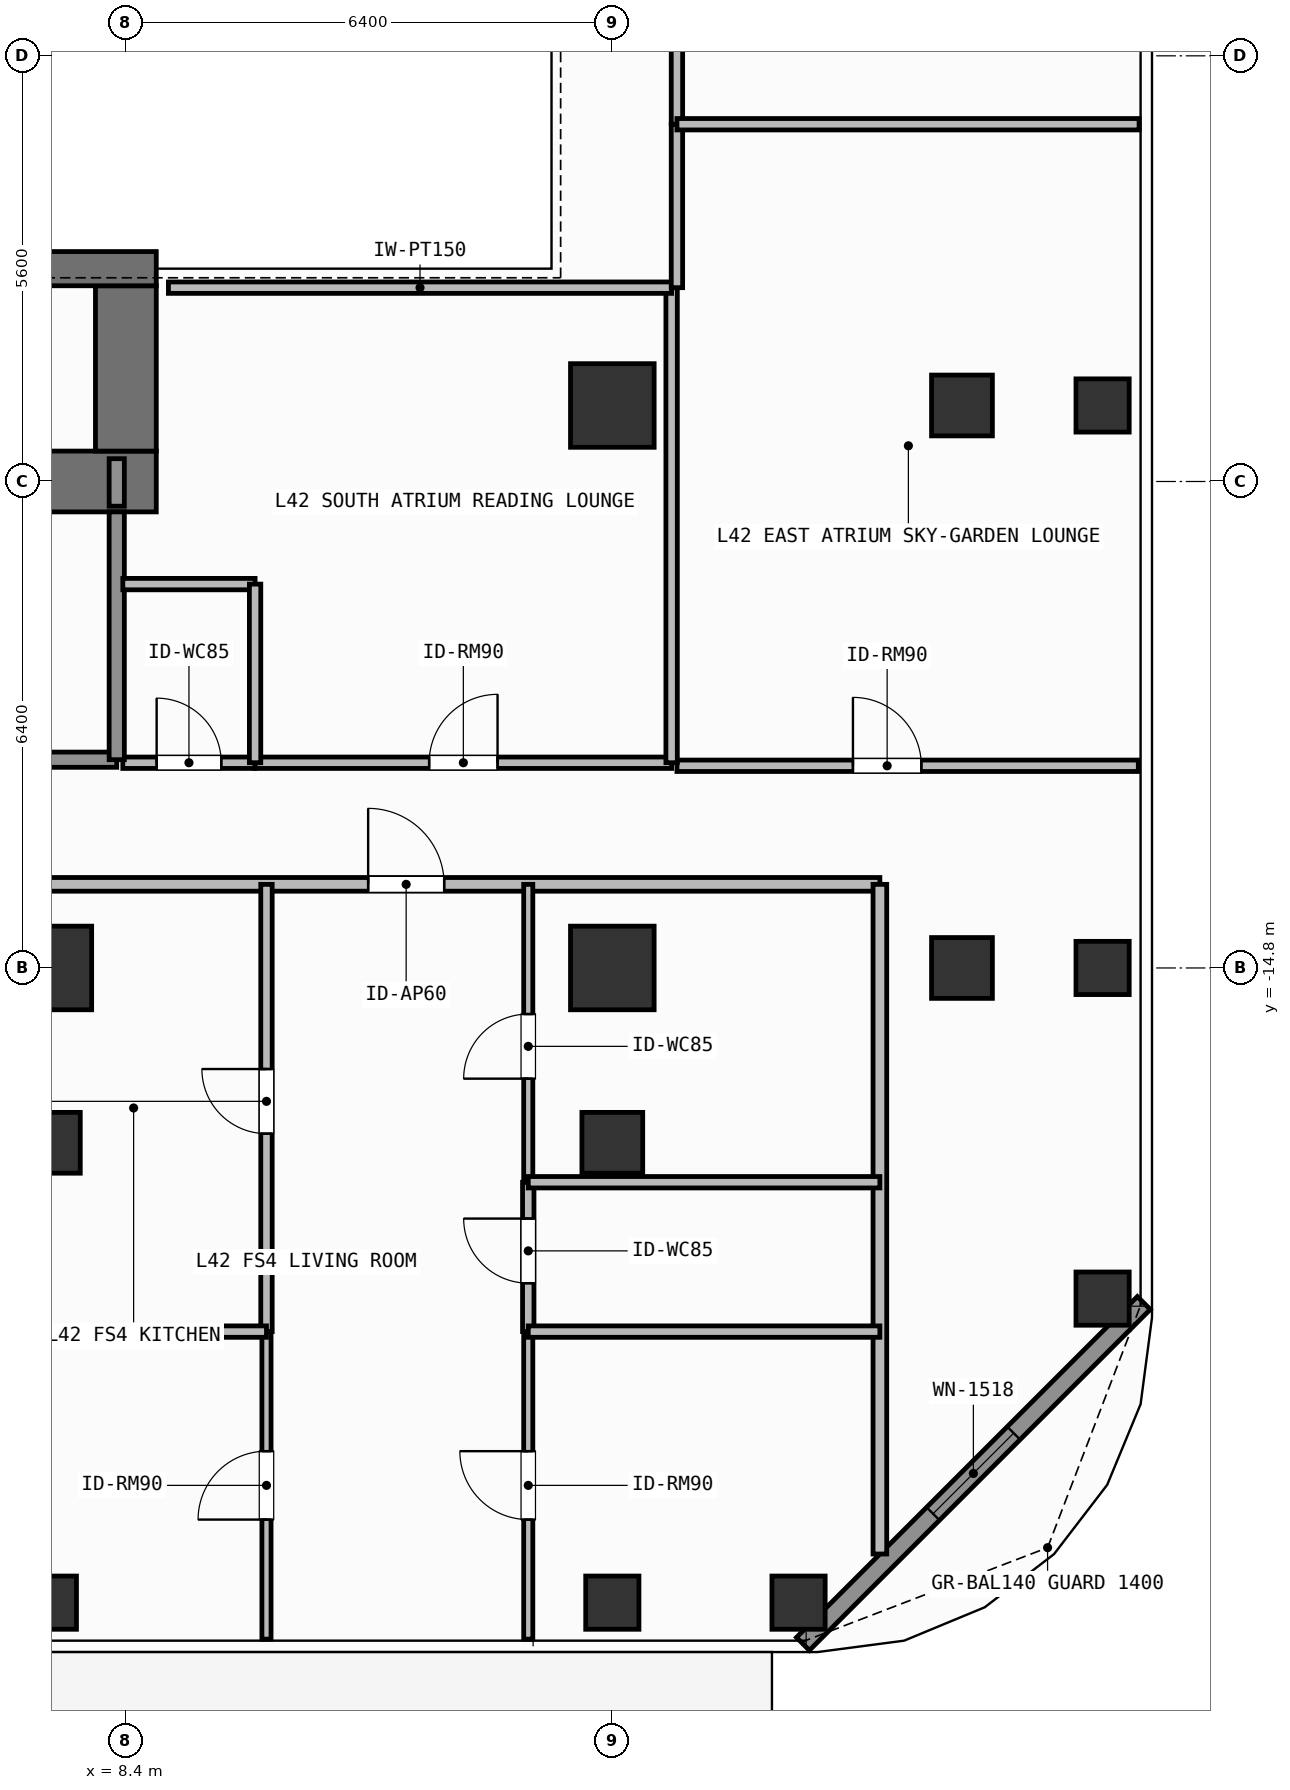
"""IFC4 building model, lengths in metres.
Left out: names, types, materials, properties, quantities, classifications, styles, units other than length and angle.
Written with IfcOpenShell. Run it as: python <this file> out.ifc"""

import sys

from ifc_helpers import new_model, si_unit, direction, frame, frame_2d, origin, origin_2d, place, context, subcontext, project, spatial, rectangle, hollow_rectangle, extrude, element, fill, save


model = new_model("IFC4")
c1 = context("Model", 3, precision=1e-05, world=origin(), true_north=direction((0.0, 1.0)))
c2 = subcontext(c1, "Body", "Model", "MODEL_VIEW")
j1 = project(units=[si_unit("LENGTHUNIT", "METRE"), si_unit("PLANEANGLEUNIT", "RADIAN")], contexts=[c1])
p1 = place(None, origin())
s1 = spatial("IfcSite", under=j1, at=p1, CompositionType="ELEMENT")
p2 = place(p1, origin())
s2 = spatial("IfcBuilding", under=s1, at=p2, CompositionType="ELEMENT")
p3 = place(p2, frame((0.0, 0.0, 171.9)))
s3 = spatial("IfcBuildingStorey", under=s2, at=p3, CompositionType="ELEMENT", Elevation=171.9)
p4 = place(p3, frame((6.12, -8.4, 0.0), z_axis=(0.0, 0.0, 1.0), x_axis=(1.0, 0.0, 0.0)))
e1 = element("IfcWall", 1, at=p4, inside=s3, PredefinedType="SHEAR", context=c2, shape_type="SweptSolid", body=[
    extrude(rectangle(XDim=2.68, YDim=0.8, at=frame_2d((1.34, 0.0))), origin(), (0.0, 0.0, 1.0), 3.9),
])
p5 = place(p3, frame((8.4, -8.0, 0.0), z_axis=(0.0, 0.0, 1.0), x_axis=(0.0, 1.0, 0.0)))
e2 = element("IfcWall", 2, at=p5, inside=s3, PredefinedType="SHEAR", context=c2, shape_type="SweptSolid", body=[
    extrude(rectangle(XDim=2.175, YDim=0.8, at=frame_2d((1.087, 0.0))), origin(), (0.0, 0.0, 1.0), 3.9),
])
p6 = place(p3, frame((3.045, -5.6, 0.0), z_axis=(0.0, 0.0, 1.0), x_axis=(1.0, 0.0, 0.0)))
e3 = element("IfcWall", 3, at=p6, inside=s3, PredefinedType="SHEAR", context=c2, shape_type="SweptSolid", body=[
    extrude(rectangle(XDim=5.755, YDim=0.45, at=frame_2d((2.877, 0.0))), origin(), (0.0, 0.0, 1.0), 3.9),
])
for number, where, z_axis, x_axis in (
    (4, (7.4, -14.8, 0.0), (0.0, 0.0, 1.0), (1.0, 0.0, 0.0)),
    (5, (14.8, -14.8, 0.0), (0.0, 0.0, 1.0), (1.0, 0.0, 0.0)),
    (6, (14.8, -7.4, 0.0), (0.0, 0.0, 1.0), (1.0, 0.0, 0.0)),
):
    element("IfcColumn", number, at=place(p3, frame(where, z_axis=z_axis, x_axis=x_axis)), inside=s3, PredefinedType="COLUMN", context=c2, shape_type="SweptSolid", body=[
        extrude(rectangle(XDim=1.1, YDim=1.1, at=origin_2d()), origin(), (0.0, 0.0, 1.0), 3.9),
    ])
for number, where, z_axis, x_axis in (
    (7, (19.4, -14.8, 0.0), (0.0, 0.0, 1.0), (1.0, 0.0, 0.0)),
    (8, (19.4, -7.4, 0.0), (0.0, 0.0, 1.0), (1.0, 0.0, 0.0)),
    (9, (7.4, -17.1, 0.0), (0.0, 0.0, 1.0), (1.0, 0.0, 0.0)),
    (10, (14.8, -17.1, 0.0), (0.0, 0.0, 1.0), (1.0, 0.0, 0.0)),
):
    element("IfcColumn", number, at=place(p3, frame(where, z_axis=z_axis, x_axis=x_axis)), inside=s3, PredefinedType="COLUMN", context=c2, shape_type="SweptSolid", body=[
        extrude(hollow_rectangle(XDim=0.8, YDim=0.8, WallThickness=0.036, at=origin_2d()), origin(), (0.0, 0.0, 1.0), 3.9),
    ])
for number, where, z_axis, x_axis in (
    (11, (17.25, -23.15, 0.0), (0.0, 0.0, 1.0), (1.0, 0.0, 0.0)),
    (12, (21.25, -19.15, 0.0), (0.0, 0.0, 1.0), (1.0, 0.0, 0.0)),
    (13, (7.4, -23.15, 0.0), (0.0, 0.0, 1.0), (1.0, 0.0, 0.0)),
    (14, (14.8, -23.15, 0.0), (0.0, 0.0, 1.0), (1.0, 0.0, 0.0)),
    (15, (21.25, -14.8, 0.0), (0.0, 0.0, 1.0), (1.0, 0.0, 0.0)),
    (16, (21.25, -7.4, 0.0), (0.0, 0.0, 1.0), (1.0, 0.0, 0.0)),
):
    element("IfcColumn", number, at=place(p3, frame(where, z_axis=z_axis, x_axis=x_axis)), inside=s3, PredefinedType="COLUMN", context=c2, shape_type="SweptSolid", body=[
        extrude(hollow_rectangle(XDim=0.7, YDim=0.7, WallThickness=0.032, at=origin_2d()), origin(), (0.0, 0.0, 1.0), 3.9),
    ])
p7 = place(p3, frame((21.792, -19.208, 0.0), z_axis=(0.0, 0.0, 1.0), x_axis=(-0.707106781187, -0.707106781187, 0.0)))
e17 = element("IfcWall", 17, at=p7, inside=s3, PredefinedType="SOLIDWALL", context=c2, shape_type="SweptSolid", body=[
    extrude(rectangle(XDim=6.343, YDim=0.24, at=frame_2d((3.171, 0.0))), origin(), (0.0, 0.0, 1.0), 3.68),
])
p8 = place(p7, frame((2.421, 0.0, 0.8)))
e18 = element("IfcOpeningElement", 18, at=p8, cuts=e17, PredefinedType="OPENING", context=c2, shape_type="SweptSolid", body=[
    extrude(rectangle(XDim=1.5, YDim=1.85, at=frame_2d((0.75, 0.925))), frame((0.0, 0.13, 0.0), z_axis=(0.0, -1.0, 0.0), x_axis=(1.0, 0.0, 0.0)), (0.0, 0.0, 1.0), 0.26),
])
p9 = place(p3, frame((4.58, -12.06, 0.0), z_axis=(0.0, 0.0, 1.0), x_axis=(1.0, 0.0, 0.0)))
e19 = element("IfcWall", 19, at=p9, inside=s3, PredefinedType="SOLIDWALL", context=c2, shape_type="SweptSolid", body=[
    extrude(rectangle(XDim=3.7, YDim=0.2, at=frame_2d((1.85, 0.0))), origin(), (0.0, 0.0, 1.0), 3.68),
])
p10 = place(p9, frame((1.212, 0.0, 0.0)))
e20 = element("IfcOpeningElement", 20, at=p10, cuts=e19, PredefinedType="OPENING", context=c2, shape_type="SweptSolid", body=[
    extrude(rectangle(XDim=1.1, YDim=2.15, at=frame_2d((0.55, 1.075))), frame((0.0, 0.11, 0.0), z_axis=(0.0, -1.0, 0.0), x_axis=(1.0, 0.0, 0.0)), (0.0, 0.0, 1.0), 0.22),
])
p11 = place(p3, frame((8.36, -12.1, 0.0), z_axis=(0.0, 0.0, 1.0), x_axis=(1.0, 0.0, 0.0)))
e21 = element("IfcWall", 21, at=p11, inside=s3, PredefinedType="PARTITIONING", context=c2, shape_type="SweptSolid", body=[
    extrude(rectangle(XDim=1.74, YDim=0.15, at=frame_2d((0.87, 0.0))), origin(), (0.0, 0.0, 1.0), 3.68),
])
p12 = place(p11, frame((0.445, 0.0, 0.0)))
e22 = element("IfcOpeningElement", 22, at=p12, cuts=e21, PredefinedType="OPENING", context=c2, shape_type="SweptSolid", body=[
    extrude(rectangle(XDim=0.85, YDim=2.1, at=frame_2d((0.425, 1.05))), frame((0.0, 0.085, 0.0), z_axis=(0.0, -1.0, 0.0), x_axis=(1.0, 0.0, 0.0)), (0.0, 0.0, 1.0), 0.17),
])
p13 = place(p3, frame((10.1, -12.1, 0.0), z_axis=(0.0, 0.0, 1.0), x_axis=(1.0, 0.0, 0.0)))
e23 = element("IfcWall", 23, at=p13, inside=s3, PredefinedType="PARTITIONING", context=c2, shape_type="SweptSolid", body=[
    extrude(rectangle(XDim=5.48, YDim=0.15, at=frame_2d((2.74, 0.0))), origin(), (0.0, 0.0, 1.0), 3.68),
])
p14 = place(p13, frame((2.29, 0.0, 0.0)))
e24 = element("IfcOpeningElement", 24, at=p14, cuts=e23, PredefinedType="OPENING", context=c2, shape_type="SweptSolid", body=[
    extrude(rectangle(XDim=0.9, YDim=2.1, at=frame_2d((0.45, 1.05))), frame((0.0, 0.085, 0.0), z_axis=(0.0, -1.0, 0.0), x_axis=(1.0, 0.0, 0.0)), (0.0, 0.0, 1.0), 0.17),
])
p15 = place(p3, frame((6.754, -13.7, 0.0), z_axis=(0.0, 0.0, 1.0), x_axis=(1.0, 0.0, 0.0)))
e25 = element("IfcWall", 25, at=p15, inside=s3, PredefinedType="PARTITIONING", context=c2, shape_type="SweptSolid", body=[
    extrude(rectangle(XDim=11.566, YDim=0.18, at=frame_2d((5.783, 0.0))), origin(), (0.0, 0.0, 1.0), 3.68),
])
p16 = place(p15, frame((4.833, 0.0, 0.0)))
e26 = element("IfcOpeningElement", 26, at=p16, cuts=e25, PredefinedType="OPENING", context=c2, shape_type="SweptSolid", body=[
    extrude(rectangle(XDim=1.0, YDim=2.2, at=frame_2d((0.5, 1.1))), frame((0.0, 0.1, 0.0), z_axis=(0.0, -1.0, 0.0), x_axis=(1.0, 0.0, 0.0)), (0.0, 0.0, 1.0), 0.2),
])
p17 = place(p3, frame((10.25, -19.584, 0.0), z_axis=(0.0, 0.0, 1.0), x_axis=(0.0, 1.0, 0.0)))
e27 = element("IfcWall", 27, at=p17, inside=s3, PredefinedType="PARTITIONING", context=c2, shape_type="SweptSolid", body=[
    extrude(rectangle(XDim=5.884, YDim=0.15, at=frame_2d((2.942, 0.0))), origin(), (0.0, 0.0, 1.0), 3.68),
])
p18 = place(p17, frame((2.604, 0.0, 0.0)))
e28 = element("IfcOpeningElement", 28, at=p18, cuts=e27, PredefinedType="OPENING", context=c2, shape_type="SweptSolid", body=[
    extrude(rectangle(XDim=0.85, YDim=2.1, at=frame_2d((0.425, 1.05))), frame((0.0, 0.085, 0.0), z_axis=(0.0, -1.0, 0.0), x_axis=(1.0, 0.0, 0.0)), (0.0, 0.0, 1.0), 0.17),
])
p19 = place(p3, frame((10.25, -23.63, 0.0), z_axis=(0.0, 0.0, 1.0), x_axis=(0.0, 1.0, 0.0)))
e29 = element("IfcWall", 29, at=p19, inside=s3, PredefinedType="PARTITIONING", context=c2, shape_type="SweptSolid", body=[
    extrude(rectangle(XDim=4.046, YDim=0.12, at=frame_2d((2.023, 0.0))), origin(), (0.0, 0.0, 1.0), 3.68),
])
p20 = place(p19, frame((1.573, 0.0, 0.0)))
e30 = element("IfcOpeningElement", 30, at=p20, cuts=e29, PredefinedType="OPENING", context=c2, shape_type="SweptSolid", body=[
    extrude(rectangle(XDim=0.9, YDim=2.1, at=frame_2d((0.45, 1.05))), frame((0.0, 0.07, 0.0), z_axis=(0.0, -1.0, 0.0), x_axis=(1.0, 0.0, 0.0)), (0.0, 0.0, 1.0), 0.14),
])
p21 = place(p3, frame((13.694, -19.584, 0.0), z_axis=(0.0, 0.0, 1.0), x_axis=(0.0, 1.0, 0.0)))
e31 = element("IfcWall", 31, at=p21, inside=s3, PredefinedType="PARTITIONING", context=c2, shape_type="SweptSolid", body=[
    extrude(rectangle(XDim=1.965, YDim=0.15, at=frame_2d((0.982, 0.0))), origin(), (0.0, 0.0, 1.0), 3.68),
])
p22 = place(p21, frame((0.637, 0.0, 0.0)))
e32 = element("IfcOpeningElement", 32, at=p22, cuts=e31, PredefinedType="OPENING", context=c2, shape_type="SweptSolid", body=[
    extrude(rectangle(XDim=0.85, YDim=2.1, at=frame_2d((0.425, 1.05))), frame((0.0, 0.085, 0.0), z_axis=(0.0, -1.0, 0.0), x_axis=(1.0, 0.0, 0.0)), (0.0, 0.0, 1.0), 0.17),
])
p23 = place(p3, frame((13.694, -17.619, 0.0), z_axis=(0.0, 0.0, 1.0), x_axis=(0.0, 1.0, 0.0)))
e33 = element("IfcWall", 33, at=p23, inside=s3, PredefinedType="PARTITIONING", context=c2, shape_type="SweptSolid", body=[
    extrude(rectangle(XDim=3.919, YDim=0.12, at=frame_2d((1.959, 0.0))), origin(), (0.0, 0.0, 1.0), 3.68),
])
p24 = place(p23, frame((1.363, 0.0, 0.0)))
e34 = element("IfcOpeningElement", 34, at=p24, cuts=e33, PredefinedType="OPENING", context=c2, shape_type="SweptSolid", body=[
    extrude(rectangle(XDim=0.85, YDim=2.1, at=frame_2d((0.425, 1.05))), frame((0.0, 0.07, 0.0), z_axis=(0.0, -1.0, 0.0), x_axis=(1.0, 0.0, 0.0)), (0.0, 0.0, 1.0), 0.14),
])
p25 = place(p3, frame((13.694, -23.63, 0.0), z_axis=(0.0, 0.0, 1.0), x_axis=(0.0, 1.0, 0.0)))
e35 = element("IfcWall", 35, at=p25, inside=s3, PredefinedType="PARTITIONING", context=c2, shape_type="SweptSolid", body=[
    extrude(rectangle(XDim=4.046, YDim=0.12, at=frame_2d((2.023, 0.0))), origin(), (0.0, 0.0, 1.0), 3.68),
])
p26 = place(p25, frame((1.573, 0.0, 0.0)))
e36 = element("IfcOpeningElement", 36, at=p26, cuts=e35, PredefinedType="OPENING", context=c2, shape_type="SweptSolid", body=[
    extrude(rectangle(XDim=0.9, YDim=2.1, at=frame_2d((0.45, 1.05))), frame((0.0, 0.07, 0.0), z_axis=(0.0, -1.0, 0.0), x_axis=(1.0, 0.0, 0.0)), (0.0, 0.0, 1.0), 0.14),
])
p27 = place(p3, frame((15.65, -12.14, 0.0), z_axis=(0.0, 0.0, 1.0), x_axis=(1.0, 0.0, 0.0)))
e37 = element("IfcWall", 37, at=p27, inside=s3, PredefinedType="PARTITIONING", context=c2, shape_type="SweptSolid", body=[
    extrude(rectangle(XDim=6.07, YDim=0.15, at=frame_2d((3.035, 0.0))), origin(), (0.0, 0.0, 1.0), 3.68),
])
p28 = place(p27, frame((2.316, 0.0, 0.0)))
e38 = element("IfcOpeningElement", 38, at=p28, cuts=e37, PredefinedType="OPENING", context=c2, shape_type="SweptSolid", body=[
    extrude(rectangle(XDim=0.9, YDim=2.1, at=frame_2d((0.45, 1.05))), frame((0.0, 0.085, 0.0), z_axis=(0.0, -1.0, 0.0), x_axis=(1.0, 0.0, 0.0)), (0.0, 0.0, 1.0), 0.17),
])
p29 = place(p3, frame((8.28, -12.06, 0.0), z_axis=(0.0, 0.0, 1.0), x_axis=(0.0, 1.0, 0.0)))
e39 = element("IfcWall", 39, at=p29, inside=s3, PredefinedType="SOLIDWALL", context=c2, shape_type="SweptSolid", body=[
    extrude(rectangle(XDim=3.26, YDim=0.2, at=frame_2d((1.63, 0.0))), origin(), (0.0, 0.0, 1.0), 3.68),
])
p30 = place(p3, frame((8.28, -8.725, 0.0), z_axis=(0.0, 0.0, 1.0), x_axis=(0.0, 1.0, 0.0)))
e40 = element("IfcWall", 40, at=p30, inside=s3, PredefinedType="SOLIDWALL", context=c2, shape_type="SweptSolid", body=[
    extrude(rectangle(XDim=0.625, YDim=0.2, at=frame_2d((0.312, 0.0))), origin(), (0.0, 0.0, 1.0), 3.68),
])
p31 = place(p3, frame((8.36, -9.75, 0.0), z_axis=(0.0, 0.0, 1.0), x_axis=(1.0, 0.0, 0.0)))
e41 = element("IfcWall", 41, at=p31, inside=s3, PredefinedType="PARTITIONING", context=c2, shape_type="SweptSolid", body=[
    extrude(rectangle(XDim=1.74, YDim=0.15, at=frame_2d((0.87, 0.0))), origin(), (0.0, 0.0, 1.0), 3.68),
])
p32 = place(p3, frame((10.1, -12.1, 0.0), z_axis=(0.0, 0.0, 1.0), x_axis=(0.0, 1.0, 0.0)))
e42 = element("IfcWall", 42, at=p32, inside=s3, PredefinedType="PARTITIONING", context=c2, shape_type="SweptSolid", body=[
    extrude(rectangle(XDim=2.35, YDim=0.15, at=frame_2d((1.175, 0.0))), origin(), (0.0, 0.0, 1.0), 3.68),
])
p33 = place(p3, frame((15.58, -12.1, 0.0), z_axis=(0.0, 0.0, 1.0), x_axis=(0.0, 1.0, 0.0)))
e43 = element("IfcWall", 43, at=p33, inside=s3, PredefinedType="PARTITIONING", context=c2, shape_type="SweptSolid", body=[
    extrude(rectangle(XDim=6.25, YDim=0.15, at=frame_2d((3.125, 0.0))), origin(), (0.0, 0.0, 1.0), 3.68),
])
p34 = place(p3, frame((8.96, -5.85, 0.0), z_axis=(0.0, 0.0, 1.0), x_axis=(1.0, 0.0, 0.0)))
e44 = element("IfcWall", 44, at=p34, inside=s3, PredefinedType="PARTITIONING", context=c2, shape_type="SweptSolid", body=[
    extrude(rectangle(XDim=6.62, YDim=0.15, at=frame_2d((3.31, 0.0))), origin(), (0.0, 0.0, 1.0), 3.68),
])
p35 = place(p3, frame((18.32, -22.51, 0.0), z_axis=(0.0, 0.0, 1.0), x_axis=(0.0, 1.0, 0.0)))
e45 = element("IfcWall", 45, at=p35, inside=s3, PredefinedType="PARTITIONING", context=c2, shape_type="SweptSolid", body=[
    extrude(rectangle(XDim=8.81, YDim=0.18, at=frame_2d((4.405, 0.0))), origin(), (0.0, 0.0, 1.0), 3.68),
])
p36 = place(p3, frame((6.754, -19.584, 0.0), z_axis=(0.0, 0.0, 1.0), x_axis=(1.0, 0.0, 0.0)))
e46 = element("IfcWall", 46, at=p36, inside=s3, PredefinedType="PARTITIONING", context=c2, shape_type="SweptSolid", body=[
    extrude(rectangle(XDim=3.496, YDim=0.15, at=frame_2d((1.748, 0.0))), origin(), (0.0, 0.0, 1.0), 3.68),
])
for number, where, z_axis, x_axis in (
    (47, (13.694, -17.619, 0.0), (0.0, 0.0, 1.0), (1.0, 0.0, 0.0)),
    (48, (13.694, -19.584, 0.0), (0.0, 0.0, 1.0), (1.0, 0.0, 0.0)),
):
    element("IfcWall", number, at=place(p3, frame(where, z_axis=z_axis, x_axis=x_axis)), inside=s3, PredefinedType="PARTITIONING", context=c2, shape_type="SweptSolid", body=[
        extrude(rectangle(XDim=4.626, YDim=0.15, at=frame_2d((2.313, 0.0))), origin(), (0.0, 0.0, 1.0), 3.68),
    ])
p37 = place(p3, frame((15.65, -5.85, 0.0), z_axis=(0.0, 0.0, 1.0), x_axis=(0.0, 1.0, 0.0)))
e49 = element("IfcWall", 49, at=p37, inside=s3, PredefinedType="PARTITIONING", context=c2, shape_type="SweptSolid", body=[
    extrude(rectangle(XDim=2.15, YDim=0.15, at=frame_2d((1.075, 0.0))), origin(), (0.0, 0.0, 1.0), 3.68),
])
p38 = place(p3, frame((15.65, -3.7, 0.0), z_axis=(0.0, 0.0, 1.0), x_axis=(0.0, 1.0, 0.0)))
e50 = element("IfcWall", 50, at=p38, inside=s3, PredefinedType="PARTITIONING", context=c2, shape_type="SweptSolid", body=[
    extrude(rectangle(XDim=9.55, YDim=0.15, at=frame_2d((4.775, 0.0))), origin(), (0.0, 0.0, 1.0), 3.68),
])
p39 = place(p3, frame((15.65, -3.7, 0.0), z_axis=(0.0, 0.0, 1.0), x_axis=(1.0, 0.0, 0.0)))
e51 = element("IfcWall", 51, at=p39, inside=s3, PredefinedType="PARTITIONING", context=c2, shape_type="SweptSolid", body=[
    extrude(rectangle(XDim=6.08, YDim=0.15, at=frame_2d((3.04, 0.0))), origin(), (0.0, 0.0, 1.0), 3.68),
])
p40 = place(p8, origin())
e52 = element("IfcWindow", 52, at=p40, inside=s3, PartitioningType="SINGLE_PANEL", PredefinedType="WINDOW", context=c2, shape_type="SweptSolid", body=[
    extrude(rectangle(XDim=1.5, YDim=1.85, at=frame_2d((0.75, 0.925))), frame((0.0, 0.03, 0.0), z_axis=(0.0, -1.0, 0.0), x_axis=(1.0, 0.0, 0.0)), (0.0, 0.0, 1.0), 0.06),
])
fill(e18, e52)
p41 = place(p12, origin())
e53 = element("IfcDoor", 53, at=p41, inside=s3, OperationType="SINGLE_SWING_LEFT", PredefinedType="DOOR", context=c2, shape_type="SweptSolid", body=[
    extrude(rectangle(XDim=0.85, YDim=2.1, at=frame_2d((0.425, 1.05))), frame((0.0, 0.025, 0.0), z_axis=(0.0, -1.0, 0.0), x_axis=(1.0, 0.0, 0.0)), (0.0, 0.0, 1.0), 0.05),
])
fill(e22, e53)
p42 = place(p14, origin())
e54 = element("IfcDoor", 54, at=p42, inside=s3, OperationType="SINGLE_SWING_RIGHT", PredefinedType="DOOR", context=c2, shape_type="SweptSolid", body=[
    extrude(rectangle(XDim=0.9, YDim=2.1, at=frame_2d((0.45, 1.05))), frame((0.0, 0.025, 0.0), z_axis=(0.0, -1.0, 0.0), x_axis=(1.0, 0.0, 0.0)), (0.0, 0.0, 1.0), 0.05),
])
fill(e24, e54)
p43 = place(p16, origin())
e55 = element("IfcDoor", 55, at=p43, inside=s3, OperationType="SINGLE_SWING_LEFT", PredefinedType="DOOR", context=c2, shape_type="SweptSolid", body=[
    extrude(rectangle(XDim=1.0, YDim=2.2, at=frame_2d((0.5, 1.1))), frame((0.0, 0.025, 0.0), z_axis=(0.0, -1.0, 0.0), x_axis=(1.0, 0.0, 0.0)), (0.0, 0.0, 1.0), 0.05),
])
fill(e26, e55)
p44 = place(p18, origin())
e56 = element("IfcDoor", 56, at=p44, inside=s3, OperationType="SINGLE_SWING_RIGHT", PredefinedType="DOOR", context=c2, shape_type="SweptSolid", body=[
    extrude(rectangle(XDim=0.85, YDim=2.1, at=frame_2d((0.425, 1.05))), frame((0.0, 0.025, 0.0), z_axis=(0.0, -1.0, 0.0), x_axis=(1.0, 0.0, 0.0)), (0.0, 0.0, 1.0), 0.05),
])
fill(e28, e56)
p45 = place(p20, origin())
e57 = element("IfcDoor", 57, at=p45, inside=s3, OperationType="SINGLE_SWING_LEFT", PredefinedType="DOOR", context=c2, shape_type="SweptSolid", body=[
    extrude(rectangle(XDim=0.9, YDim=2.1, at=frame_2d((0.45, 1.05))), frame((0.0, 0.025, 0.0), z_axis=(0.0, -1.0, 0.0), x_axis=(1.0, 0.0, 0.0)), (0.0, 0.0, 1.0), 0.05),
])
fill(e30, e57)
p46 = place(p22, origin())
e58 = element("IfcDoor", 58, at=p46, inside=s3, OperationType="SINGLE_SWING_RIGHT", PredefinedType="DOOR", context=c2, shape_type="SweptSolid", body=[
    extrude(rectangle(XDim=0.85, YDim=2.1, at=frame_2d((0.425, 1.05))), frame((0.0, 0.025, 0.0), z_axis=(0.0, -1.0, 0.0), x_axis=(1.0, 0.0, 0.0)), (0.0, 0.0, 1.0), 0.05),
])
fill(e32, e58)
p47 = place(p24, origin())
e59 = element("IfcDoor", 59, at=p47, inside=s3, OperationType="SINGLE_SWING_LEFT", PredefinedType="DOOR", context=c2, shape_type="SweptSolid", body=[
    extrude(rectangle(XDim=0.85, YDim=2.1, at=frame_2d((0.425, 1.05))), frame((0.0, 0.025, 0.0), z_axis=(0.0, -1.0, 0.0), x_axis=(1.0, 0.0, 0.0)), (0.0, 0.0, 1.0), 0.05),
])
fill(e34, e59)
p48 = place(p26, origin())
e60 = element("IfcDoor", 60, at=p48, inside=s3, OperationType="SINGLE_SWING_RIGHT", PredefinedType="DOOR", context=c2, shape_type="SweptSolid", body=[
    extrude(rectangle(XDim=0.9, YDim=2.1, at=frame_2d((0.45, 1.05))), frame((0.0, 0.025, 0.0), z_axis=(0.0, -1.0, 0.0), x_axis=(1.0, 0.0, 0.0)), (0.0, 0.0, 1.0), 0.05),
])
fill(e36, e60)
p49 = place(p28, origin())
e61 = element("IfcDoor", 61, at=p49, inside=s3, OperationType="SINGLE_SWING_LEFT", PredefinedType="DOOR", context=c2, shape_type="SweptSolid", body=[
    extrude(rectangle(XDim=0.9, YDim=2.1, at=frame_2d((0.45, 1.05))), frame((0.0, 0.025, 0.0), z_axis=(0.0, -1.0, 0.0), x_axis=(1.0, 0.0, 0.0)), (0.0, 0.0, 1.0), 0.05),
])
fill(e38, e61)
save(model, sys.argv[1])
